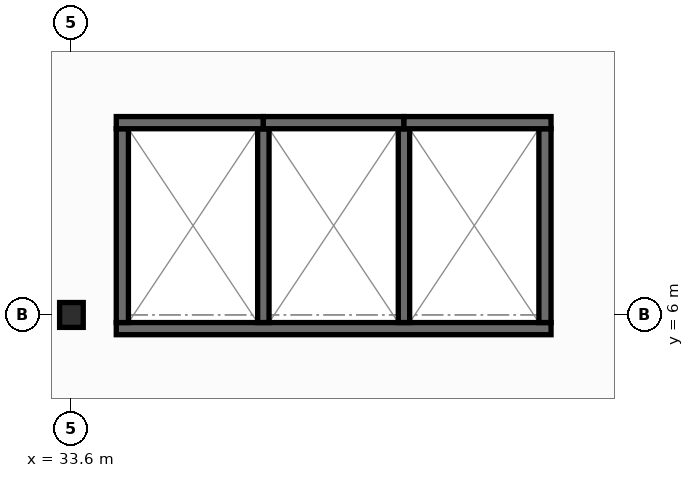
"""IFC4 building model, lengths in metres.
Left out: names, types, materials, properties, quantities, classifications, styles, units other than length and angle.
Written with IfcOpenShell. Run it as: python <this file> out.ifc"""

import sys

from ifc_helpers import new_model, si_unit, direction, frame, frame_2d, origin, origin_2d, place, context, subcontext, project, spatial, rectangle, i_section, extrude, element, save


model = new_model("IFC4")
c1 = context("Model", 3, precision=1e-05, world=origin(), true_north=direction((0.0, 1.0)))
c2 = subcontext(c1, "Body", "Model", "MODEL_VIEW")
j1 = project(units=[si_unit("LENGTHUNIT", "METRE"), si_unit("PLANEANGLEUNIT", "RADIAN")], contexts=[c1])
p1 = place(None, origin())
s1 = spatial("IfcSite", under=j1, at=p1, CompositionType="ELEMENT")
p2 = place(p1, origin())
s2 = spatial("IfcBuilding", under=s1, at=p2, CompositionType="ELEMENT")
p3 = place(p2, frame((0.0, 0.0, 81.75)))
s3 = spatial("IfcBuildingStorey", under=s2, at=p3, CompositionType="ELEMENT", Elevation=81.75)
p4 = place(p3, frame((33.6, 6.0, 0.0), z_axis=(0.0, 0.0, 1.0), x_axis=(1.0, 0.0, 0.0)))
e1 = element("IfcColumn", 1, at=p4, inside=s3, PredefinedType="COLUMN", context=c2, shape_type="SweptSolid", body=[
    extrude(i_section(OverallWidth=0.311, OverallDepth=0.327, WebThickness=0.016, FlangeThickness=0.025, FilletRadius=0.017, at=origin_2d()), origin(), (0.0, 0.0, 1.0), 3.95),
])
p5 = place(p3, frame((34.19, 5.82, 0.0), z_axis=(0.0, 0.0, 1.0), x_axis=(1.0, 0.0, 0.0)))
e2 = element("IfcWall", 2, at=p5, inside=s3, PredefinedType="SHEAR", context=c2, shape_type="SweptSolid", body=[
    extrude(rectangle(XDim=5.72, YDim=0.16, at=frame_2d((2.86, 0.0))), origin(), (0.0, 0.0, 1.0), 3.71),
])
for number, where, z_axis, x_axis in (
    (3, (34.27, 5.9, 0.0), (0.0, 0.0, 1.0), (0.0, 1.0, 0.0)),
    (4, (39.83, 5.9, 0.0), (0.0, 0.0, 1.0), (0.0, 1.0, 0.0)),
):
    element("IfcWall", number, at=place(p3, frame(where, z_axis=z_axis, x_axis=x_axis)), inside=s3, PredefinedType="SHEAR", context=c2, shape_type="SweptSolid", body=[
        extrude(rectangle(XDim=2.55, YDim=0.16, at=frame_2d((1.275, 0.0))), origin(), (0.0, 0.0, 1.0), 3.71),
    ])
for number, where, z_axis, x_axis in (
    (5, (36.125, 5.9, 0.0), (0.0, 0.0, 1.0), (0.0, 1.0, 0.0)),
    (6, (37.975, 5.9, 0.0), (0.0, 0.0, 1.0), (0.0, 1.0, 0.0)),
):
    element("IfcWall", number, at=place(p3, frame(where, z_axis=z_axis, x_axis=x_axis)), inside=s3, PredefinedType="SHEAR", context=c2, shape_type="SweptSolid", body=[
        extrude(rectangle(XDim=2.55, YDim=0.15, at=frame_2d((1.275, 0.0))), origin(), (0.0, 0.0, 1.0), 3.71),
    ])
p6 = place(p3, frame((34.19, 8.53, 0.0), z_axis=(0.0, 0.0, 1.0), x_axis=(1.0, 0.0, 0.0)))
e7 = element("IfcWall", 7, at=p6, inside=s3, PredefinedType="SHEAR", context=c2, shape_type="SweptSolid", body=[
    extrude(rectangle(XDim=1.935, YDim=0.16, at=frame_2d((0.968, 0.0))), origin(), (0.0, 0.0, 1.0), 3.71),
])
p7 = place(p3, frame((36.125, 8.53, 0.0), z_axis=(0.0, 0.0, 1.0), x_axis=(1.0, 0.0, 0.0)))
e8 = element("IfcWall", 8, at=p7, inside=s3, PredefinedType="SHEAR", context=c2, shape_type="SweptSolid", body=[
    extrude(rectangle(XDim=1.85, YDim=0.16, at=frame_2d((0.925, 0.0))), origin(), (0.0, 0.0, 1.0), 3.71),
])
p8 = place(p3, frame((37.975, 8.53, 0.0), z_axis=(0.0, 0.0, 1.0), x_axis=(1.0, 0.0, 0.0)))
e9 = element("IfcWall", 9, at=p8, inside=s3, PredefinedType="SHEAR", context=c2, shape_type="SweptSolid", body=[
    extrude(rectangle(XDim=1.935, YDim=0.16, at=frame_2d((0.967, 0.0))), origin(), (0.0, 0.0, 1.0), 3.71),
])
save(model, sys.argv[1])
